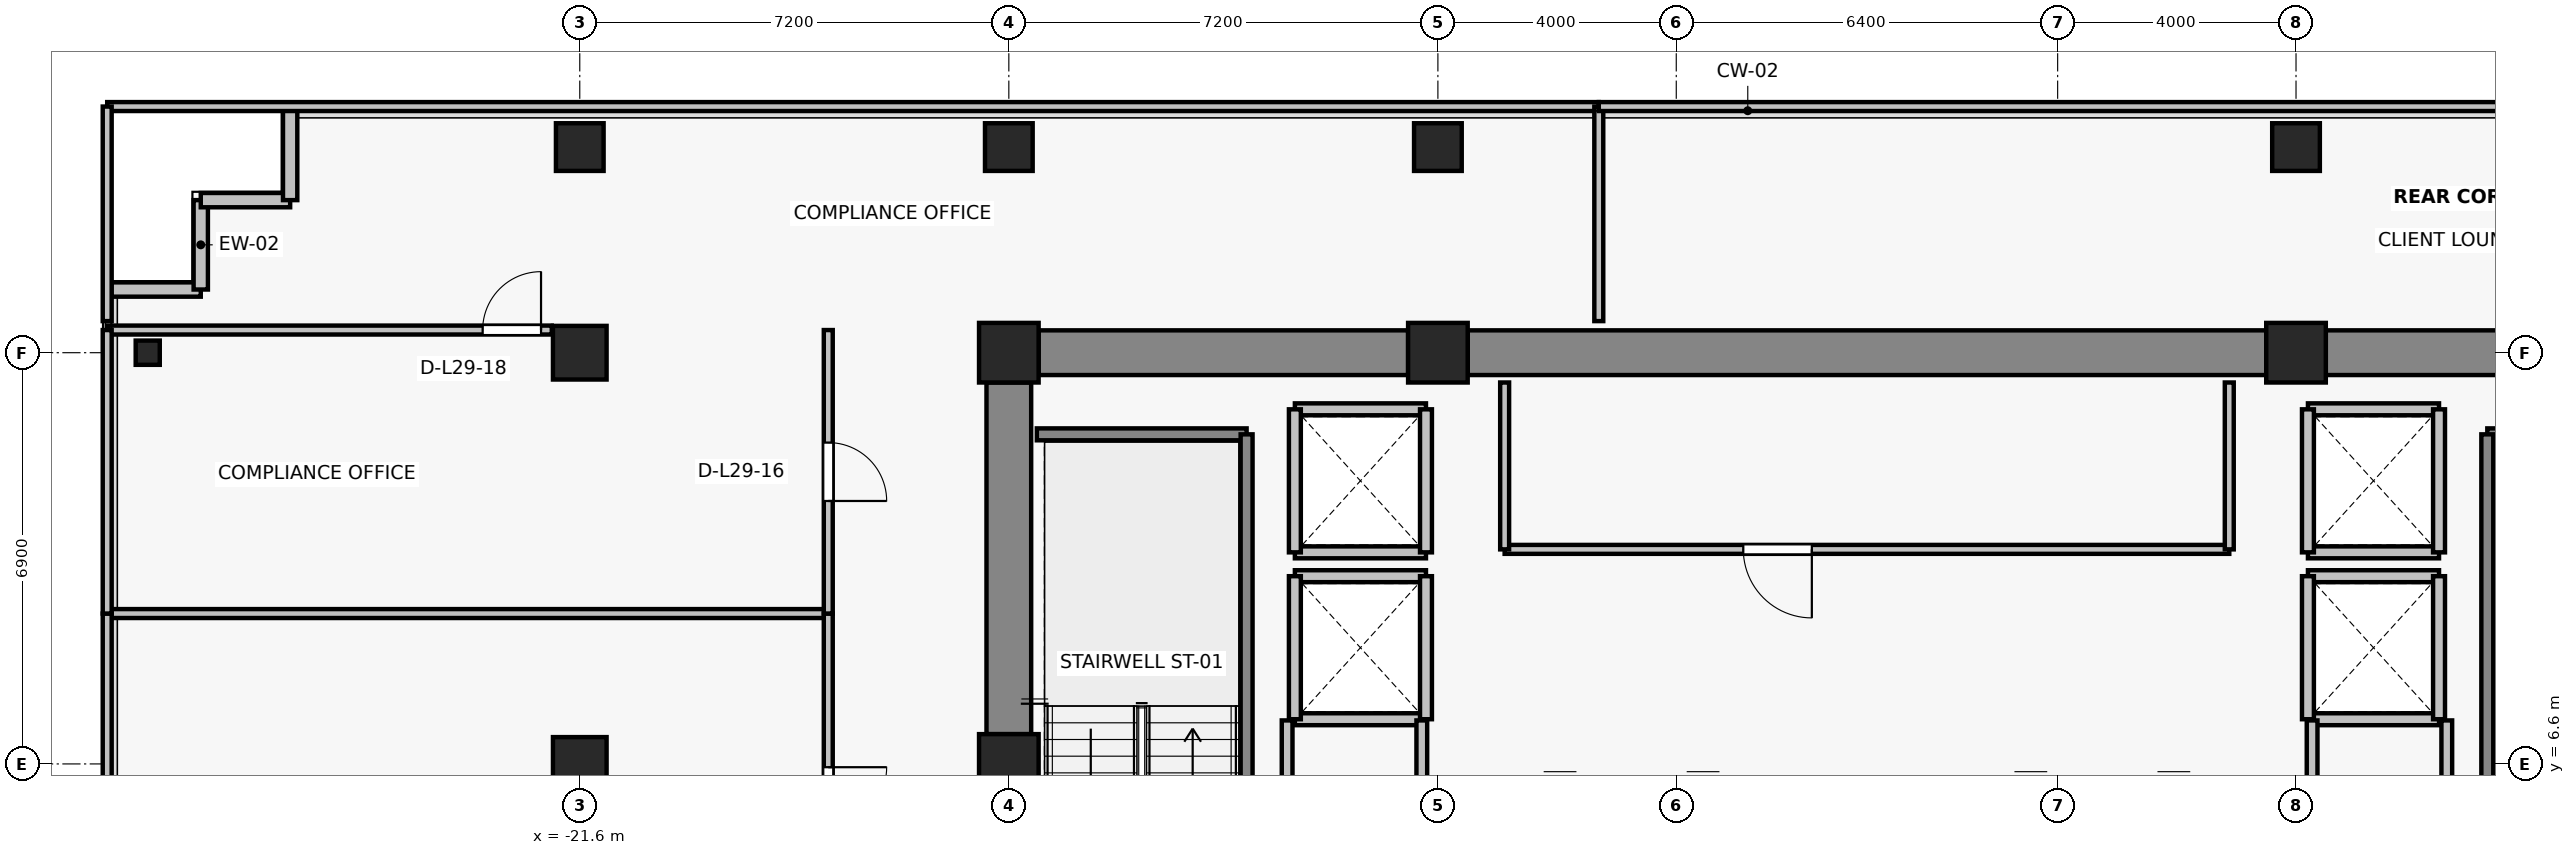
"""IFC4 building model, lengths in metres.
Left out: names, types, materials, properties, quantities, classifications, styles, units other than length and angle.
Written with IfcOpenShell. Run it as: python <this file> out.ifc"""

import sys

from ifc_helpers import new_model, si_unit, direction, frame, frame_2d, origin, origin_2d, place, context, subcontext, project, spatial, rectangle, i_section, extrude, source, transform, mapped, element, fill, save


model = new_model("IFC4")
c1 = context("Model", 3, precision=1e-05, world=origin(), true_north=direction((0.0, 1.0)))
c2 = subcontext(c1, "Body", "Model", "MODEL_VIEW")
j1 = project(units=[si_unit("LENGTHUNIT", "METRE"), si_unit("PLANEANGLEUNIT", "RADIAN")], contexts=[c1])
p1 = place(None, origin())
s1 = spatial("IfcSite", under=j1, at=p1, CompositionType="ELEMENT")
p2 = place(p1, origin())
s2 = spatial("IfcBuilding", under=s1, at=p2, CompositionType="ELEMENT")
p3 = place(p2, frame((0.0, 0.0, 106.6)))
s3 = spatial("IfcBuildingStorey", under=s2, at=p3, CompositionType="ELEMENT", Elevation=106.6)
for number, where, z_axis, x_axis in (
    (1, (-14.4, 6.6, 0.0), (0.0, 0.0, 1.0), (1.0, 0.0, 0.0)),
    (2, (-14.4, 13.5, 0.0), (0.0, 0.0, 1.0), (1.0, 0.0, 0.0)),
    (3, (-7.2, 13.5, 0.0), (0.0, 0.0, 1.0), (1.0, 0.0, 0.0)),
    (4, (7.2, 13.5, 0.0), (0.0, 0.0, 1.0), (1.0, 0.0, 0.0)),
):
    element("IfcColumn", number, at=place(p3, frame(where, z_axis=z_axis, x_axis=x_axis)), inside=s3, PredefinedType="COLUMN", context=c2, shape_type="SweptSolid", body=[
        extrude(rectangle(XDim=1.0, YDim=1.0, at=origin_2d()), origin(), (0.0, 0.0, 1.0), 3.3),
    ])
for number, where, z_axis, x_axis in (
    (5, (-21.6, 6.6, 0.0), (0.0, 0.0, 1.0), (1.0, 0.0, 0.0)),
    (6, (-21.6, 13.5, 0.0), (0.0, 0.0, 1.0), (1.0, 0.0, 0.0)),
):
    element("IfcColumn", number, at=place(p3, frame(where, z_axis=z_axis, x_axis=x_axis)), inside=s3, PredefinedType="COLUMN", context=c2, shape_type="SweptSolid", body=[
        extrude(rectangle(XDim=0.9, YDim=0.9, at=origin_2d()), origin(), (0.0, 0.0, 1.0), 3.3),
    ])
for number, where, z_axis, x_axis in (
    (7, (-14.4, 16.95, 0.0), (0.0, 0.0, 1.0), (1.0, 0.0, 0.0)),
    (8, (-7.2, 16.95, 0.0), (0.0, 0.0, 1.0), (1.0, 0.0, 0.0)),
    (9, (7.2, 16.95, 0.0), (0.0, 0.0, 1.0), (1.0, 0.0, 0.0)),
    (10, (-21.6, 16.95, 0.0), (0.0, 0.0, 1.0), (1.0, 0.0, 0.0)),
):
    element("IfcColumn", number, at=place(p3, frame(where, z_axis=z_axis, x_axis=x_axis)), inside=s3, PredefinedType="COLUMN", context=c2, shape_type="SweptSolid", body=[
        extrude(rectangle(XDim=0.8, YDim=0.8, at=origin_2d()), origin(), (0.0, 0.0, 1.0), 3.3),
    ])
p4 = place(p3, frame((-28.85, 13.5, 0.0), z_axis=(0.0, 0.0, 1.0), x_axis=(1.0, 0.0, 0.0)))
e11 = element("IfcColumn", 11, at=p4, inside=s3, PredefinedType="COLUMN", context=c2, shape_type="SweptSolid", body=[
    extrude(i_section(OverallWidth=0.404, OverallDepth=0.407, WebThickness=0.022, FlangeThickness=0.032, FilletRadius=0.015, at=origin_2d()), origin(), (0.0, 0.0, 1.0), 3.3),
])
p5 = place(p3, frame((-13.9, 13.5, 0.0), z_axis=(0.0, 0.0, 1.0), x_axis=(1.0, 0.0, 0.0)))
e12 = element("IfcWall", 12, at=p5, inside=s3, PredefinedType="SHEAR", context=c2, shape_type="SweptSolid", body=[
    extrude(rectangle(XDim=6.2, YDim=0.75, at=frame_2d((3.1, 0.0))), origin(), (0.0, 0.0, 1.0), 3.075),
])
p6 = place(p3, frame((-6.7, 13.5, 0.0), z_axis=(0.0, 0.0, 1.0), x_axis=(1.0, 0.0, 0.0)))
e13 = element("IfcWall", 13, at=p6, inside=s3, PredefinedType="SHEAR", context=c2, shape_type="SweptSolid", body=[
    extrude(rectangle(XDim=13.4, YDim=0.75, at=frame_2d((6.7, 0.0))), origin(), (0.0, 0.0, 1.0), 3.075),
])
p7 = place(p3, frame((7.7, 13.5, 0.0), z_axis=(0.0, 0.0, 1.0), x_axis=(1.0, 0.0, 0.0)))
e14 = element("IfcWall", 14, at=p7, inside=s3, PredefinedType="SHEAR", context=c2, shape_type="SweptSolid", body=[
    extrude(rectangle(XDim=6.2, YDim=0.75, at=frame_2d((3.1, 0.0))), origin(), (0.0, 0.0, 1.0), 3.075),
])
p8 = place(p3, frame((-14.4, 7.1, 0.0), z_axis=(0.0, 0.0, 1.0), x_axis=(0.0, 1.0, 0.0)))
e15 = element("IfcWall", 15, at=p8, inside=s3, PredefinedType="SHEAR", context=c2, shape_type="SweptSolid", body=[
    extrude(rectangle(XDim=5.9, YDim=0.75, at=frame_2d((2.95, 0.0))), origin(), (0.0, 0.0, 1.0), 3.075),
])
for number, where, z_axis, x_axis in (
    (16, (-27.96, 14.56, 0.0), (0.0, 0.0, 1.0), (-1.0, 0.0, 0.0)),
    (17, (-27.96, 16.06, 0.0), (0.0, 0.0, 1.0), (0.0, -1.0, 0.0)),
    (18, (-26.46, 16.06, 0.0), (0.0, 0.0, 1.0), (-1.0, 0.0, 0.0)),
    (19, (-26.46, 17.56, 0.0), (0.0, 0.0, 1.0), (0.0, -1.0, 0.0)),
):
    element("IfcWall", number, at=place(p3, frame(where, z_axis=z_axis, x_axis=x_axis)), inside=s3, PredefinedType="SOLIDWALL", context=c2, shape_type="SweptSolid", body=[
        extrude(rectangle(XDim=1.5, YDim=0.24, at=frame_2d((0.75, 0.0))), origin(), (0.0, 0.0, 1.0), 3.075),
    ])
for number, where, z_axis, x_axis in (
    (20, (-7.4, 7.35, 0.0), (0.0, 0.0, 1.0), (-1.0, 0.0, 0.0)),
    (21, (-9.6, 9.75, 0.0), (0.0, 0.0, 1.0), (1.0, 0.0, 0.0)),
):
    element("IfcWall", number, at=place(p3, frame(where, z_axis=z_axis, x_axis=x_axis)), inside=s3, PredefinedType="SOLIDWALL", context=c2, shape_type="SweptSolid", body=[
        extrude(rectangle(XDim=2.2, YDim=0.2, at=frame_2d((1.1, 0.0))), origin(), (0.0, 0.0, 1.0), 2.515),
    ])
p9 = place(p3, frame((-9.6, 7.35, 0.0), z_axis=(0.0, 0.0, 1.0), x_axis=(0.0, 1.0, 0.0)))
e22 = element("IfcWall", 22, at=p9, inside=s3, PredefinedType="SOLIDWALL", context=c2, shape_type="SweptSolid", body=[
    extrude(rectangle(XDim=2.4, YDim=0.2, at=frame_2d((1.2, 0.0))), origin(), (0.0, 0.0, 1.0), 3.075),
])
p10 = place(p3, frame((-7.4, 9.75, 0.0), z_axis=(0.0, 0.0, 1.0), x_axis=(0.0, -1.0, 0.0)))
e23 = element("IfcWall", 23, at=p10, inside=s3, PredefinedType="SOLIDWALL", context=c2, shape_type="SweptSolid", body=[
    extrude(rectangle(XDim=2.4, YDim=0.2, at=frame_2d((1.2, 0.0))), origin(), (0.0, 0.0, 1.0), 2.515),
])
for number, where, z_axis, x_axis in (
    (24, (-7.4, 10.15, 0.0), (0.0, 0.0, 1.0), (-1.0, 0.0, 0.0)),
    (25, (-9.6, 12.55, 0.0), (0.0, 0.0, 1.0), (1.0, 0.0, 0.0)),
):
    element("IfcWall", number, at=place(p3, frame(where, z_axis=z_axis, x_axis=x_axis)), inside=s3, PredefinedType="SOLIDWALL", context=c2, shape_type="SweptSolid", body=[
        extrude(rectangle(XDim=2.2, YDim=0.2, at=frame_2d((1.1, 0.0))), origin(), (0.0, 0.0, 1.0), 2.515),
    ])
p11 = place(p3, frame((-9.6, 10.15, 0.0), z_axis=(0.0, 0.0, 1.0), x_axis=(0.0, 1.0, 0.0)))
e26 = element("IfcWall", 26, at=p11, inside=s3, PredefinedType="SOLIDWALL", context=c2, shape_type="SweptSolid", body=[
    extrude(rectangle(XDim=2.4, YDim=0.2, at=frame_2d((1.2, 0.0))), origin(), (0.0, 0.0, 1.0), 3.075),
])
p12 = place(p3, frame((-7.4, 12.55, 0.0), z_axis=(0.0, 0.0, 1.0), x_axis=(0.0, -1.0, 0.0)))
e27 = element("IfcWall", 27, at=p12, inside=s3, PredefinedType="SOLIDWALL", context=c2, shape_type="SweptSolid", body=[
    extrude(rectangle(XDim=2.4, YDim=0.2, at=frame_2d((1.2, 0.0))), origin(), (0.0, 0.0, 1.0), 2.515),
])
for number, where, z_axis, x_axis in (
    (28, (9.6, 7.35, 0.0), (0.0, 0.0, 1.0), (-1.0, 0.0, 0.0)),
    (29, (7.4, 9.75, 0.0), (0.0, 0.0, 1.0), (1.0, 0.0, 0.0)),
):
    element("IfcWall", number, at=place(p3, frame(where, z_axis=z_axis, x_axis=x_axis)), inside=s3, PredefinedType="SOLIDWALL", context=c2, shape_type="SweptSolid", body=[
        extrude(rectangle(XDim=2.2, YDim=0.2, at=frame_2d((1.1, 0.0))), origin(), (0.0, 0.0, 1.0), 2.515),
    ])
p13 = place(p3, frame((7.4, 7.35, 0.0), z_axis=(0.0, 0.0, 1.0), x_axis=(0.0, 1.0, 0.0)))
e30 = element("IfcWall", 30, at=p13, inside=s3, PredefinedType="SOLIDWALL", context=c2, shape_type="SweptSolid", body=[
    extrude(rectangle(XDim=2.4, YDim=0.2, at=frame_2d((1.2, 0.0))), origin(), (0.0, 0.0, 1.0), 2.515),
])
p14 = place(p3, frame((9.6, 9.75, 0.0), z_axis=(0.0, 0.0, 1.0), x_axis=(0.0, -1.0, 0.0)))
e31 = element("IfcWall", 31, at=p14, inside=s3, PredefinedType="SOLIDWALL", context=c2, shape_type="SweptSolid", body=[
    extrude(rectangle(XDim=2.4, YDim=0.2, at=frame_2d((1.2, 0.0))), origin(), (0.0, 0.0, 1.0), 3.075),
])
for number, where, z_axis, x_axis in (
    (32, (9.6, 10.15, 0.0), (0.0, 0.0, 1.0), (-1.0, 0.0, 0.0)),
    (33, (7.4, 12.55, 0.0), (0.0, 0.0, 1.0), (1.0, 0.0, 0.0)),
):
    element("IfcWall", number, at=place(p3, frame(where, z_axis=z_axis, x_axis=x_axis)), inside=s3, PredefinedType="SOLIDWALL", context=c2, shape_type="SweptSolid", body=[
        extrude(rectangle(XDim=2.2, YDim=0.2, at=frame_2d((1.1, 0.0))), origin(), (0.0, 0.0, 1.0), 2.515),
    ])
p15 = place(p3, frame((7.4, 10.15, 0.0), z_axis=(0.0, 0.0, 1.0), x_axis=(0.0, 1.0, 0.0)))
e34 = element("IfcWall", 34, at=p15, inside=s3, PredefinedType="SOLIDWALL", context=c2, shape_type="SweptSolid", body=[
    extrude(rectangle(XDim=2.4, YDim=0.2, at=frame_2d((1.2, 0.0))), origin(), (0.0, 0.0, 1.0), 2.515),
])
p16 = place(p3, frame((9.6, 12.55, 0.0), z_axis=(0.0, 0.0, 1.0), x_axis=(0.0, -1.0, 0.0)))
e35 = element("IfcWall", 35, at=p16, inside=s3, PredefinedType="SOLIDWALL", context=c2, shape_type="SweptSolid", body=[
    extrude(rectangle(XDim=2.4, YDim=0.2, at=frame_2d((1.2, 0.0))), origin(), (0.0, 0.0, 1.0), 3.075),
])
p17 = place(p3, frame((-13.93, 12.13, 0.0), z_axis=(0.0, 0.0, 1.0), x_axis=(1.0, 0.0, 0.0)))
e36 = element("IfcWall", 36, at=p17, inside=s3, PredefinedType="SOLIDWALL", context=c2, shape_type="SweptSolid", body=[
    extrude(rectangle(XDim=3.52, YDim=0.2, at=frame_2d((1.76, 0.0))), origin(), (0.0, 0.0, 1.0), 3.075),
])
p18 = place(p3, frame((-10.41, 12.13, 0.0), z_axis=(0.0, 0.0, 1.0), x_axis=(0.0, -1.0, 0.0)))
e37 = element("IfcWall", 37, at=p18, inside=s3, PredefinedType="SOLIDWALL", context=c2, shape_type="SweptSolid", body=[
    extrude(rectangle(XDim=8.84, YDim=0.2, at=frame_2d((4.42, 0.0))), origin(), (0.0, 0.0, 1.0), 3.075),
])
p19 = place(p3, frame((10.41, 12.13, 0.0), z_axis=(0.0, 0.0, 1.0), x_axis=(1.0, 0.0, 0.0)))
e38 = element("IfcWall", 38, at=p19, inside=s3, PredefinedType="SOLIDWALL", context=c2, shape_type="SweptSolid", body=[
    extrude(rectangle(XDim=3.52, YDim=0.2, at=frame_2d((1.76, 0.0))), origin(), (0.0, 0.0, 1.0), 3.075),
])
p20 = place(p3, frame((10.41, 3.29, 0.0), z_axis=(0.0, 0.0, 1.0), x_axis=(0.0, 1.0, 0.0)))
e39 = element("IfcWall", 39, at=p20, inside=s3, PredefinedType="SOLIDWALL", context=c2, shape_type="SweptSolid", body=[
    extrude(rectangle(XDim=8.84, YDim=0.2, at=frame_2d((4.42, 0.0))), origin(), (0.0, 0.0, 1.0), 3.075),
])
p21 = place(p3, frame((-9.73, 6.24, 0.0), z_axis=(0.0, 0.0, 1.0), x_axis=(0.0, 1.0, 0.0)))
e40 = element("IfcWall", 40, at=p21, inside=s3, PredefinedType="PARTITIONING", context=c2, shape_type="SweptSolid", body=[
    extrude(rectangle(XDim=1.09, YDim=0.18, at=frame_2d((0.545, 0.0))), origin(), (0.0, 0.0, 1.0), 3.075),
])
for number, where, z_axis, x_axis in (
    (41, (-7.47, 7.33, 0.0), (0.0, 0.0, 1.0), (0.0, -1.0, 0.0)),
    (42, (7.47, 6.24, 0.0), (0.0, 0.0, 1.0), (0.0, 1.0, 0.0)),
):
    element("IfcWall", number, at=place(p3, frame(where, z_axis=z_axis, x_axis=x_axis)), inside=s3, PredefinedType="PARTITIONING", context=c2, shape_type="SweptSolid", body=[
        extrude(rectangle(XDim=1.09, YDim=0.18, at=frame_2d((0.545, 0.0))), origin(), (0.0, 0.0, 1.0), 2.515),
    ])
p22 = place(p3, frame((9.73, 7.33, 0.0), z_axis=(0.0, 0.0, 1.0), x_axis=(0.0, -1.0, 0.0)))
e43 = element("IfcWall", 43, at=p22, inside=s3, PredefinedType="PARTITIONING", context=c2, shape_type="SweptSolid", body=[
    extrude(rectangle(XDim=1.09, YDim=0.18, at=frame_2d((0.545, 0.0))), origin(), (0.0, 0.0, 1.0), 3.075),
])
p23 = place(p3, frame((6.08, 10.2, 0.0), z_axis=(0.0, 0.0, 1.0), x_axis=(-1.0, 0.0, 0.0)))
e44 = element("IfcWall", 44, at=p23, inside=s3, PredefinedType="PARTITIONING", context=c2, shape_type="SweptSolid", body=[
    extrude(rectangle(XDim=12.16, YDim=0.15, at=frame_2d((6.08, 0.0))), origin(), (0.0, 0.0, 1.0), 3.075),
])
p24 = place(p23, frame((7.005, 0.0, 0.0)))
e45 = element("IfcOpeningElement", 45, at=p24, cuts=e44, PredefinedType="OPENING", context=c2, shape_type="SweptSolid", body=[
    extrude(rectangle(XDim=1.15, YDim=2.15, at=frame_2d((0.575, 1.075))), frame((0.0, 0.085, 0.0), z_axis=(0.0, -1.0, 0.0), x_axis=(1.0, 0.0, 0.0)), (0.0, 0.0, 1.0), 0.17),
])
for number, where, z_axis, x_axis in (
    (46, (-6.08, 10.2, 0.0), (0.0, 0.0, 1.0), (0.0, 1.0, 0.0)),
    (47, (6.08, 13.0, 0.0), (0.0, 0.0, 1.0), (0.0, -1.0, 0.0)),
):
    element("IfcWall", number, at=place(p3, frame(where, z_axis=z_axis, x_axis=x_axis)), inside=s3, PredefinedType="PARTITIONING", context=c2, shape_type="SweptSolid", body=[
        extrude(rectangle(XDim=2.8, YDim=0.15, at=frame_2d((1.4, 0.0))), origin(), (0.0, 0.0, 1.0), 3.075),
    ])
p25 = place(p3, frame((-29.53, 9.123, 0.0), z_axis=(0.0, 0.0, 1.0), x_axis=(1.0, 0.0, 0.0)))
e48 = element("IfcWall", 48, at=p25, inside=s3, PredefinedType="PARTITIONING", context=c2, shape_type="SweptSolid", body=[
    extrude(rectangle(XDim=12.1, YDim=0.15, at=frame_2d((6.05, 0.0))), origin(), (0.0, 0.0, 1.0), 2.515),
])
p26 = place(p3, frame((-29.53, 2.987, 0.0), z_axis=(0.0, 0.0, 1.0), x_axis=(0.0, 1.0, 0.0)))
e49 = element("IfcWall", 49, at=p26, inside=s3, PredefinedType="PARTITIONING", context=c2, shape_type="SweptSolid", body=[
    extrude(rectangle(XDim=6.136, YDim=0.15, at=frame_2d((3.068, 0.0))), origin(), (0.0, 0.0, 1.0), 3.075),
])
p27 = place(p3, frame((-17.43, 9.123, 0.0), z_axis=(0.0, 0.0, 1.0), x_axis=(0.0, -1.0, 0.0)))
e50 = element("IfcWall", 50, at=p27, inside=s3, PredefinedType="PARTITIONING", context=c2, shape_type="SweptSolid", body=[
    extrude(rectangle(XDim=6.136, YDim=0.15, at=frame_2d((3.068, 0.0))), origin(), (0.0, 0.0, 1.0), 2.515),
])
p28 = place(p27, frame((2.578, 0.0, 0.0)))
e51 = element("IfcOpeningElement", 51, at=p28, cuts=e50, PredefinedType="OPENING", context=c2, shape_type="SweptSolid", body=[
    extrude(rectangle(XDim=0.98, YDim=2.15, at=frame_2d((0.49, 1.075))), frame((0.0, 0.085, 0.0), z_axis=(0.0, -1.0, 0.0), x_axis=(1.0, 0.0, 0.0)), (0.0, 0.0, 1.0), 0.17),
])
p29 = place(p3, frame((-29.53, 13.88, 0.0), z_axis=(0.0, 0.0, 1.0), x_axis=(1.0, 0.0, 0.0)))
e52 = element("IfcWall", 52, at=p29, inside=s3, PredefinedType="PARTITIONING", context=c2, shape_type="SweptSolid", body=[
    extrude(rectangle(XDim=7.46, YDim=0.15, at=frame_2d((3.73, 0.0))), origin(), (0.0, 0.0, 1.0), 3.075),
])
p30 = place(p29, frame((6.3, 0.0, 0.0)))
e53 = element("IfcOpeningElement", 53, at=p30, cuts=e52, PredefinedType="OPENING", context=c2, shape_type="SweptSolid", body=[
    extrude(rectangle(XDim=0.98, YDim=2.15, at=frame_2d((0.49, 1.075))), frame((0.0, 0.085, 0.0), z_axis=(0.0, -1.0, 0.0), x_axis=(1.0, 0.0, 0.0)), (0.0, 0.0, 1.0), 0.17),
])
p31 = place(p3, frame((-29.53, 9.123, 0.0), z_axis=(0.0, 0.0, 1.0), x_axis=(0.0, 1.0, 0.0)))
e54 = element("IfcWall", 54, at=p31, inside=s3, PredefinedType="PARTITIONING", context=c2, shape_type="SweptSolid", body=[
    extrude(rectangle(XDim=4.757, YDim=0.15, at=frame_2d((2.378, 0.0))), origin(), (0.0, 0.0, 1.0), 3.075),
])
p32 = place(p3, frame((-17.43, 13.88, 0.0), z_axis=(0.0, 0.0, 1.0), x_axis=(0.0, -1.0, 0.0)))
e55 = element("IfcWall", 55, at=p32, inside=s3, PredefinedType="PARTITIONING", context=c2, shape_type="SweptSolid", body=[
    extrude(rectangle(XDim=4.757, YDim=0.15, at=frame_2d((2.378, 0.0))), origin(), (0.0, 0.0, 1.0), 2.515),
])
p33 = place(p32, frame((1.888, 0.0, 0.0)))
e56 = element("IfcOpeningElement", 56, at=p33, cuts=e55, PredefinedType="OPENING", context=c2, shape_type="SweptSolid", body=[
    extrude(rectangle(XDim=0.98, YDim=2.15, at=frame_2d((0.49, 1.075))), frame((0.0, 0.085, 0.0), z_axis=(0.0, -1.0, 0.0), x_axis=(1.0, 0.0, 0.0)), (0.0, 0.0, 1.0), 0.17),
])
p34 = place(p3, frame((-29.53, 17.63, 0.0), z_axis=(0.0, 0.0, 1.0), x_axis=(1.0, 0.0, 0.0)))
e57 = element("IfcWall", 57, at=p34, inside=s3, PredefinedType="PARTITIONING", context=c2, shape_type="SweptSolid", body=[
    extrude(rectangle(XDim=25.03, YDim=0.15, at=frame_2d((12.515, 0.0))), origin(), (0.0, 0.0, 1.0), 3.075),
])
p35 = place(p3, frame((-29.53, 14.03, 0.0), z_axis=(0.0, 0.0, 1.0), x_axis=(0.0, 1.0, 0.0)))
e58 = element("IfcWall", 58, at=p35, inside=s3, PredefinedType="PARTITIONING", context=c2, shape_type="SweptSolid", body=[
    extrude(rectangle(XDim=3.6, YDim=0.15, at=frame_2d((1.8, 0.0))), origin(), (0.0, 0.0, 1.0), 3.075),
])
p36 = place(p3, frame((-4.5, 17.63, 0.0), z_axis=(0.0, 0.0, 1.0), x_axis=(0.0, -1.0, 0.0)))
e59 = element("IfcWall", 59, at=p36, inside=s3, PredefinedType="PARTITIONING", context=c2, shape_type="SweptSolid", body=[
    extrude(rectangle(XDim=3.6, YDim=0.15, at=frame_2d((1.8, 0.0))), origin(), (0.0, 0.0, 1.0), 2.565),
])
p37 = place(p3, frame((-4.5, 17.63, 0.0), z_axis=(0.0, 0.0, 1.0), x_axis=(1.0, 0.0, 0.0)))
e60 = element("IfcWall", 60, at=p37, inside=s3, PredefinedType="PARTITIONING", context=c2, shape_type="SweptSolid", body=[
    extrude(rectangle(XDim=30.03, YDim=0.15, at=frame_2d((15.015, 0.0))), origin(), (0.0, 0.0, 1.0), 3.075),
])
m1 = source(origin(), c2, "Body", "SweptSolid", [
    extrude(rectangle(XDim=1.15, YDim=2.15, at=frame_2d((0.575, 1.075))), frame((0.0, 0.025, 0.0), z_axis=(0.0, -1.0, 0.0), x_axis=(1.0, 0.0, 0.0)), (0.0, 0.0, 1.0), 0.05),
])
p38 = place(p24, origin())
e61 = element("IfcDoor", 61, at=p38, inside=s3, OperationType="SINGLE_SWING_LEFT", PredefinedType="DOOR", context=c2, shape_type="MappedRepresentation", body=[
    mapped(m1, transform((0.0, 0.0, 0.0), x_axis=(1.0, 0.0, 0.0), y_axis=(0.0, 1.0, 0.0), z_axis=(0.0, 0.0, 1.0), scale=1.0)),
])
fill(e45, e61)
m2 = source(origin(), c2, "Body", "SweptSolid", [
    extrude(rectangle(XDim=0.98, YDim=2.15, at=frame_2d((0.49, 1.075))), frame((0.0, 0.025, 0.0), z_axis=(0.0, -1.0, 0.0), x_axis=(1.0, 0.0, 0.0)), (0.0, 0.0, 1.0), 0.05),
])
p39 = place(p28, origin())
e62 = element("IfcDoor", 62, at=p39, inside=s3, OperationType="SINGLE_SWING_LEFT", PredefinedType="DOOR", context=c2, shape_type="MappedRepresentation", body=[
    mapped(m2, transform((0.0, 0.0, 0.0), x_axis=(1.0, 0.0, 0.0), y_axis=(0.0, 1.0, 0.0), z_axis=(0.0, 0.0, 1.0), scale=1.0)),
])
fill(e51, e62)
p40 = place(p33, origin())
e63 = element("IfcDoor", 63, at=p40, inside=s3, OperationType="SINGLE_SWING_RIGHT", PredefinedType="DOOR", context=c2, shape_type="MappedRepresentation", body=[
    mapped(m2, transform((0.0, 0.0, 0.0), x_axis=(1.0, 0.0, 0.0), y_axis=(0.0, 1.0, 0.0), z_axis=(0.0, 0.0, 1.0), scale=1.0)),
])
fill(e56, e63)
p41 = place(p30, origin())
e64 = element("IfcDoor", 64, at=p41, inside=s3, OperationType="SINGLE_SWING_RIGHT", PredefinedType="DOOR", context=c2, shape_type="MappedRepresentation", body=[
    mapped(m2, transform((0.0, 0.0, 0.0), x_axis=(1.0, 0.0, 0.0), y_axis=(0.0, 1.0, 0.0), z_axis=(0.0, 0.0, 1.0), scale=1.0)),
])
fill(e53, e64)
save(model, sys.argv[1])
